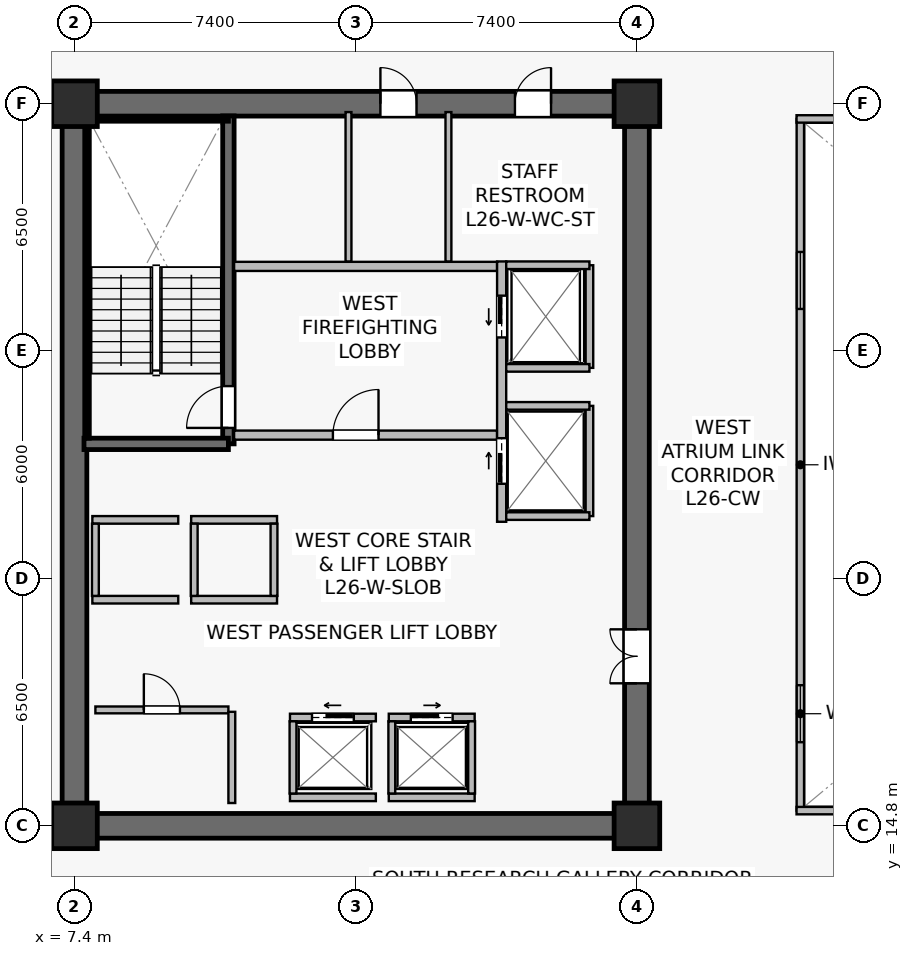
"""IFC4 building model, lengths in metres.
Left out: names, types, materials, properties, quantities, classifications, styles, units other than length and angle.
Written with IfcOpenShell. Run it as: python <this file> out.ifc"""

import sys

from ifc_helpers import new_model, si_unit, direction, frame, frame_2d, origin, origin_2d, place, context, subcontext, project, spatial, rectangle, extrude, source, transform, mapped, element, fill, save


model = new_model("IFC4")
c1 = context("Model", 3, precision=1e-05, world=origin(), true_north=direction((0.0, 1.0)))
c2 = subcontext(c1, "Body", "Model", "MODEL_VIEW")
j1 = project(units=[si_unit("LENGTHUNIT", "METRE"), si_unit("PLANEANGLEUNIT", "RADIAN")], contexts=[c1])
p1 = place(None, origin())
s1 = spatial("IfcSite", under=j1, at=p1, CompositionType="ELEMENT")
p2 = place(p1, origin())
s2 = spatial("IfcBuilding", under=s1, at=p2, CompositionType="ELEMENT")
p3 = place(p2, frame((0.0, 0.0, 109.2)))
s3 = spatial("IfcBuildingStorey", under=s2, at=p3, CompositionType="ELEMENT", Elevation=109.2)
p4 = place(p3, frame((7.075, 14.8, 0.0), z_axis=(0.0, 0.0, 1.0), x_axis=(1.0, 0.0, 0.0)))
e1 = element("IfcWall", 1, at=p4, inside=s3, PredefinedType="SHEAR", context=c2, shape_type="SweptSolid", body=[
    extrude(rectangle(XDim=15.45, YDim=0.65, at=frame_2d((7.725, 0.0))), origin(), (0.0, 0.0, 1.0), 3.79),
])
p5 = place(p3, frame((7.075, 33.8, 0.0), z_axis=(0.0, 0.0, 1.0), x_axis=(1.0, 0.0, 0.0)))
e2 = element("IfcWall", 2, at=p5, inside=s3, PredefinedType="SHEAR", context=c2, shape_type="SweptSolid", body=[
    extrude(rectangle(XDim=15.45, YDim=0.65, at=frame_2d((7.725, 0.0))), origin(), (0.0, 0.0, 1.0), 3.79),
])
p6 = place(p5, frame((8.375, 0.0, 0.0)))
e3 = element("IfcOpeningElement", 3, at=p6, cuts=e2, PredefinedType="OPENING", context=c2, shape_type="SweptSolid", body=[
    extrude(rectangle(XDim=0.95, YDim=2.15, at=frame_2d((0.475, 1.075))), frame((0.0, 0.335, 0.0), z_axis=(0.0, -1.0, 0.0), x_axis=(1.0, 0.0, 0.0)), (0.0, 0.0, 1.0), 0.67),
])
p7 = place(p5, frame((11.915, 0.0, 0.0)))
e4 = element("IfcOpeningElement", 4, at=p7, cuts=e2, PredefinedType="OPENING", context=c2, shape_type="SweptSolid", body=[
    extrude(rectangle(XDim=0.95, YDim=2.15, at=frame_2d((0.475, 1.075))), frame((0.0, 0.335, 0.0), z_axis=(0.0, -1.0, 0.0), x_axis=(1.0, 0.0, 0.0)), (0.0, 0.0, 1.0), 0.67),
])
p8 = place(p3, frame((7.4, 15.125, 0.0), z_axis=(0.0, 0.0, 1.0), x_axis=(0.0, 1.0, 0.0)))
e5 = element("IfcWall", 5, at=p8, inside=s3, PredefinedType="SHEAR", context=c2, shape_type="SweptSolid", body=[
    extrude(rectangle(XDim=18.35, YDim=0.65, at=frame_2d((9.175, 0.0))), origin(), (0.0, 0.0, 1.0), 3.79),
])
p9 = place(p3, frame((22.2, 15.125, 0.0), z_axis=(0.0, 0.0, 1.0), x_axis=(0.0, 1.0, 0.0)))
e6 = element("IfcWall", 6, at=p9, inside=s3, PredefinedType="SHEAR", context=c2, shape_type="SweptSolid", body=[
    extrude(rectangle(XDim=18.35, YDim=0.65, at=frame_2d((9.175, 0.0))), origin(), (0.0, 0.0, 1.0), 3.79),
])
p10 = place(p9, frame((3.425, 0.0, 0.0)))
e7 = element("IfcOpeningElement", 7, at=p10, cuts=e6, PredefinedType="OPENING", context=c2, shape_type="SweptSolid", body=[
    extrude(rectangle(XDim=1.42, YDim=2.2, at=frame_2d((0.71, 1.1))), frame((0.0, 0.335, 0.0), z_axis=(0.0, -1.0, 0.0), x_axis=(1.0, 0.0, 0.0)), (0.0, 0.0, 1.0), 0.67),
])
p11 = place(p3, frame((11.45, 24.85, 0.0), z_axis=(0.0, 0.0, 1.0), x_axis=(0.0, 1.0, 0.0)))
e8 = element("IfcWall", 8, at=p11, inside=s3, PredefinedType="SHEAR", context=c2, shape_type="SweptSolid", body=[
    extrude(rectangle(XDim=8.63, YDim=0.3, at=frame_2d((4.315, 0.0))), origin(), (0.0, 0.0, 1.0), 3.79),
])
p12 = place(p11, frame((0.42, 0.0, 0.0)))
e9 = element("IfcOpeningElement", 9, at=p12, cuts=e8, PredefinedType="OPENING", context=c2, shape_type="SweptSolid", body=[
    extrude(rectangle(XDim=1.1, YDim=2.15, at=frame_2d((0.55, 1.075))), frame((0.0, 0.16, 0.0), z_axis=(0.0, -1.0, 0.0), x_axis=(1.0, 0.0, 0.0)), (0.0, 0.0, 1.0), 0.32),
])
p13 = place(p3, frame((7.65, 24.85, 0.0), z_axis=(0.0, 0.0, 1.0), x_axis=(1.0, 0.0, 0.0)))
e10 = element("IfcWall", 10, at=p13, inside=s3, PredefinedType="SHEAR", context=c2, shape_type="SweptSolid", body=[
    extrude(rectangle(XDim=3.8, YDim=0.3, at=frame_2d((1.9, 0.0))), origin(), (0.0, 0.0, 1.0), 3.79),
])
p14 = place(p3, frame((7.73, 33.4, 0.0), z_axis=(0.0, 0.0, 1.0), x_axis=(1.0, 0.0, 0.0)))
e11 = element("IfcWall", 11, at=p14, inside=s3, PredefinedType="SOLIDWALL", context=c2, shape_type="SweptSolid", body=[
    extrude(rectangle(XDim=3.72, YDim=0.12, at=frame_2d((1.86, 0.0))), origin(), (0.0, 0.0, 1.0), 3.79),
])
p15 = place(p3, frame((7.73, 25.0, 0.0), z_axis=(0.0, 0.0, 1.0), x_axis=(0.0, 1.0, 0.0)))
e12 = element("IfcWall", 12, at=p15, inside=s3, PredefinedType="SOLIDWALL", context=c2, shape_type="SweptSolid", body=[
    extrude(rectangle(XDim=8.32, YDim=0.12, at=frame_2d((4.16, 0.0))), origin(), (0.0, 0.0, 1.0), 3.79),
])
m1 = source(origin(), c2, "Body", "SweptSolid", [
    extrude(rectangle(XDim=1.2, YDim=1.2, at=origin_2d()), origin(), (0.0, 0.0, 1.0), 4.1),
])
for number, where, z_axis, x_axis in (
    (13, (7.4, 14.8, 0.0), (0.0, 0.0, 1.0), (1.0, 0.0, 0.0)),
    (14, (22.2, 14.8, 0.0), (0.0, 0.0, 1.0), (1.0, 0.0, 0.0)),
    (15, (7.4, 33.8, 0.0), (0.0, 0.0, 1.0), (1.0, 0.0, 0.0)),
    (16, (22.2, 33.8, 0.0), (0.0, 0.0, 1.0), (1.0, 0.0, 0.0)),
):
    element("IfcColumn", number, at=place(p3, frame(where, z_axis=z_axis, x_axis=x_axis)), inside=s3, PredefinedType="COLUMN", context=c2, shape_type="MappedRepresentation", body=[
        mapped(m1, transform((0.0, 0.0, 0.0), scale=1.0)),
    ])
p16 = place(p3, frame((11.6, 25.08, 0.0), z_axis=(0.0, 0.0, 1.0), x_axis=(1.0, 0.0, 0.0)))
e17 = element("IfcWall", 17, at=p16, inside=s3, PredefinedType="SOLIDWALL", context=c2, shape_type="SweptSolid", body=[
    extrude(rectangle(XDim=6.92, YDim=0.24, at=frame_2d((3.46, 0.0))), origin(), (0.0, 0.0, 1.0), 3.125),
])
p17 = place(p16, frame((2.6, 0.0, 0.0)))
e18 = element("IfcOpeningElement", 18, at=p17, cuts=e17, PredefinedType="OPENING", context=c2, shape_type="SweptSolid", body=[
    extrude(rectangle(XDim=1.2, YDim=2.16, at=frame_2d((0.6, 1.08))), frame((0.0, 0.13, 0.0), z_axis=(0.0, -1.0, 0.0), x_axis=(1.0, 0.0, 0.0)), (0.0, 0.0, 1.0), 0.26),
])
p18 = place(p3, frame((11.6, 29.52, 0.0), z_axis=(0.0, 0.0, 1.0), x_axis=(1.0, 0.0, 0.0)))
e19 = element("IfcWall", 19, at=p18, inside=s3, PredefinedType="SOLIDWALL", context=c2, shape_type="SweptSolid", body=[
    extrude(rectangle(XDim=6.92, YDim=0.24, at=frame_2d((3.46, 0.0))), origin(), (0.0, 0.0, 1.0), 3.125),
])
p19 = place(p3, frame((18.64, 22.8, 0.0), z_axis=(0.0, 0.0, 1.0), x_axis=(0.0, 1.0, 0.0)))
e20 = element("IfcWall", 20, at=p19, inside=s3, PredefinedType="SOLIDWALL", context=c2, shape_type="SweptSolid", body=[
    extrude(rectangle(XDim=6.85, YDim=0.24, at=frame_2d((3.425, 0.0))), origin(), (0.0, 0.0, 1.0), 2.875),
])
p20 = place(p19, frame((4.85, 0.0, 0.0)))
e21 = element("IfcOpeningElement", 21, at=p20, cuts=e20, PredefinedType="OPENING", context=c2, shape_type="SweptSolid", body=[
    extrude(rectangle(XDim=1.1, YDim=2.22, at=frame_2d((0.55, 1.11))), frame((0.0, 0.13, 0.0), z_axis=(0.0, -1.0, 0.0), x_axis=(1.0, 0.0, 0.0)), (0.0, 0.0, 1.0), 0.26),
])
p21 = place(p19, frame((1.0, 0.0, 0.0)))
e22 = element("IfcOpeningElement", 22, at=p21, cuts=e20, PredefinedType="OPENING", context=c2, shape_type="SweptSolid", body=[
    extrude(rectangle(XDim=1.2, YDim=2.22, at=frame_2d((0.6, 1.11))), frame((0.0, 0.13, 0.0), z_axis=(0.0, -1.0, 0.0), x_axis=(1.0, 0.0, 0.0)), (0.0, 0.0, 1.0), 0.26),
])
p22 = place(p3, frame((13.07, 17.65, 0.0), z_axis=(0.0, 0.0, 1.0), x_axis=(1.0, 0.0, 0.0)))
e23 = element("IfcWall", 23, at=p22, inside=s3, PredefinedType="SOLIDWALL", context=c2, shape_type="SweptSolid", body=[
    extrude(rectangle(XDim=2.26, YDim=0.2, at=frame_2d((1.13, 0.0))), origin(), (0.0, 0.0, 1.0), 3.125),
])
p23 = place(p22, frame((0.58, 0.0, 0.0)))
e24 = element("IfcOpeningElement", 24, at=p23, cuts=e23, PredefinedType="OPENING", context=c2, shape_type="SweptSolid", body=[
    extrude(rectangle(XDim=1.1, YDim=2.22, at=frame_2d((0.55, 1.11))), frame((0.0, 0.11, 0.0), z_axis=(0.0, -1.0, 0.0), x_axis=(1.0, 0.0, 0.0)), (0.0, 0.0, 1.0), 0.22),
])
p24 = place(p3, frame((13.07, 15.55, 0.0), z_axis=(0.0, 0.0, 1.0), x_axis=(1.0, 0.0, 0.0)))
e25 = element("IfcWall", 25, at=p24, inside=s3, PredefinedType="SOLIDWALL", context=c2, shape_type="SweptSolid", body=[
    extrude(rectangle(XDim=2.26, YDim=0.2, at=frame_2d((1.13, 0.0))), origin(), (0.0, 0.0, 1.0), 3.125),
])
p25 = place(p3, frame((13.15, 15.65, 0.0), z_axis=(0.0, 0.0, 1.0), x_axis=(0.0, 1.0, 0.0)))
e26 = element("IfcWall", 26, at=p25, inside=s3, PredefinedType="SOLIDWALL", context=c2, shape_type="SweptSolid", body=[
    extrude(rectangle(XDim=1.9, YDim=0.18, at=frame_2d((0.95, 0.0))), origin(), (0.0, 0.0, 1.0), 3.79),
])
p26 = place(p3, frame((15.67, 17.65, 0.0), z_axis=(0.0, 0.0, 1.0), x_axis=(1.0, 0.0, 0.0)))
e27 = element("IfcWall", 27, at=p26, inside=s3, PredefinedType="SOLIDWALL", context=c2, shape_type="SweptSolid", body=[
    extrude(rectangle(XDim=2.26, YDim=0.2, at=frame_2d((1.13, 0.0))), origin(), (0.0, 0.0, 1.0), 3.79),
])
p27 = place(p26, frame((0.58, 0.0, 0.0)))
e28 = element("IfcOpeningElement", 28, at=p27, cuts=e27, PredefinedType="OPENING", context=c2, shape_type="SweptSolid", body=[
    extrude(rectangle(XDim=1.1, YDim=2.22, at=frame_2d((0.55, 1.11))), frame((0.0, 0.11, 0.0), z_axis=(0.0, -1.0, 0.0), x_axis=(1.0, 0.0, 0.0)), (0.0, 0.0, 1.0), 0.22),
])
p28 = place(p3, frame((15.67, 15.55, 0.0), z_axis=(0.0, 0.0, 1.0), x_axis=(1.0, 0.0, 0.0)))
e29 = element("IfcWall", 29, at=p28, inside=s3, PredefinedType="SOLIDWALL", context=c2, shape_type="SweptSolid", body=[
    extrude(rectangle(XDim=2.26, YDim=0.2, at=frame_2d((1.13, 0.0))), origin(), (0.0, 0.0, 1.0), 3.79),
])
for number, where, z_axis, x_axis in (
    (30, (15.75, 15.65, 0.0), (0.0, 0.0, 1.0), (0.0, 1.0, 0.0)),
    (31, (17.85, 15.65, 0.0), (0.0, 0.0, 1.0), (0.0, 1.0, 0.0)),
):
    element("IfcWall", number, at=place(p3, frame(where, z_axis=z_axis, x_axis=x_axis)), inside=s3, PredefinedType="SOLIDWALL", context=c2, shape_type="SweptSolid", body=[
        extrude(rectangle(XDim=1.9, YDim=0.18, at=frame_2d((0.95, 0.0))), origin(), (0.0, 0.0, 1.0), 3.79),
    ])
for number, where, z_axis, x_axis in (
    (32, (7.87, 20.75, 0.0), (0.0, 0.0, 1.0), (1.0, 0.0, 0.0)),
    (33, (7.87, 22.85, 0.0), (0.0, 0.0, 1.0), (1.0, 0.0, 0.0)),
):
    element("IfcWall", number, at=place(p3, frame(where, z_axis=z_axis, x_axis=x_axis)), inside=s3, PredefinedType="SOLIDWALL", context=c2, shape_type="SweptSolid", body=[
        extrude(rectangle(XDim=2.26, YDim=0.2, at=frame_2d((1.13, 0.0))), origin(), (0.0, 0.0, 1.0), 3.79),
    ])
p29 = place(p3, frame((7.95, 20.85, 0.0), z_axis=(0.0, 0.0, 1.0), x_axis=(0.0, 1.0, 0.0)))
e34 = element("IfcWall", 34, at=p29, inside=s3, PredefinedType="SOLIDWALL", context=c2, shape_type="SweptSolid", body=[
    extrude(rectangle(XDim=1.9, YDim=0.18, at=frame_2d((0.95, 0.0))), origin(), (0.0, 0.0, 1.0), 3.79),
])
for number, where, z_axis, x_axis in (
    (35, (10.47, 20.75, 0.0), (0.0, 0.0, 1.0), (1.0, 0.0, 0.0)),
    (36, (10.47, 22.85, 0.0), (0.0, 0.0, 1.0), (1.0, 0.0, 0.0)),
):
    element("IfcWall", number, at=place(p3, frame(where, z_axis=z_axis, x_axis=x_axis)), inside=s3, PredefinedType="SOLIDWALL", context=c2, shape_type="SweptSolid", body=[
        extrude(rectangle(XDim=2.26, YDim=0.2, at=frame_2d((1.13, 0.0))), origin(), (0.0, 0.0, 1.0), 3.79),
    ])
for number, where, z_axis, x_axis in (
    (37, (10.55, 20.85, 0.0), (0.0, 0.0, 1.0), (0.0, 1.0, 0.0)),
    (38, (12.65, 20.85, 0.0), (0.0, 0.0, 1.0), (0.0, 1.0, 0.0)),
):
    element("IfcWall", number, at=place(p3, frame(where, z_axis=z_axis, x_axis=x_axis)), inside=s3, PredefinedType="SOLIDWALL", context=c2, shape_type="SweptSolid", body=[
        extrude(rectangle(XDim=1.9, YDim=0.18, at=frame_2d((0.95, 0.0))), origin(), (0.0, 0.0, 1.0), 3.79),
    ])
p30 = place(p3, frame((20.95, 26.85, 0.0), z_axis=(0.0, 0.0, 1.0), x_axis=(0.0, 1.0, 0.0)))
e39 = element("IfcWall", 39, at=p30, inside=s3, PredefinedType="SOLIDWALL", context=c2, shape_type="SweptSolid", body=[
    extrude(rectangle(XDim=2.7, YDim=0.2, at=frame_2d((1.35, 0.0))), origin(), (0.0, 0.0, 1.0), 3.79),
])
p31 = place(p3, frame((18.76, 29.55, 0.0), z_axis=(0.0, 0.0, 1.0), x_axis=(1.0, 0.0, 0.0)))
e40 = element("IfcWall", 40, at=p31, inside=s3, PredefinedType="SOLIDWALL", context=c2, shape_type="SweptSolid", body=[
    extrude(rectangle(XDim=2.19, YDim=0.2, at=frame_2d((1.095, 0.0))), origin(), (0.0, 0.0, 1.0), 3.79),
])
p32 = place(p3, frame((18.76, 26.85, 0.0), z_axis=(0.0, 0.0, 1.0), x_axis=(1.0, 0.0, 0.0)))
e41 = element("IfcWall", 41, at=p32, inside=s3, PredefinedType="SOLIDWALL", context=c2, shape_type="SweptSolid", body=[
    extrude(rectangle(XDim=2.19, YDim=0.2, at=frame_2d((1.095, 0.0))), origin(), (0.0, 0.0, 1.0), 3.187),
])
p33 = place(p3, frame((20.95, 22.95, 0.0), z_axis=(0.0, 0.0, 1.0), x_axis=(0.0, 1.0, 0.0)))
e42 = element("IfcWall", 42, at=p33, inside=s3, PredefinedType="SOLIDWALL", context=c2, shape_type="SweptSolid", body=[
    extrude(rectangle(XDim=2.9, YDim=0.2, at=frame_2d((1.45, 0.0))), origin(), (0.0, 0.0, 1.0), 2.875),
])
for number, where, z_axis, x_axis in (
    (43, (18.76, 25.85, 0.0), (0.0, 0.0, 1.0), (1.0, 0.0, 0.0)),
    (44, (18.76, 22.95, 0.0), (0.0, 0.0, 1.0), (1.0, 0.0, 0.0)),
):
    element("IfcWall", number, at=place(p3, frame(where, z_axis=z_axis, x_axis=x_axis)), inside=s3, PredefinedType="SOLIDWALL", context=c2, shape_type="SweptSolid", body=[
        extrude(rectangle(XDim=2.19, YDim=0.2, at=frame_2d((1.095, 0.0))), origin(), (0.0, 0.0, 1.0), 3.79),
    ])
p34 = place(p3, frame((7.95, 17.85, 0.0), z_axis=(0.0, 0.0, 1.0), x_axis=(1.0, 0.0, 0.0)))
e45 = element("IfcWall", 45, at=p34, inside=s3, PredefinedType="SOLIDWALL", context=c2, shape_type="SweptSolid", body=[
    extrude(rectangle(XDim=3.5, YDim=0.18, at=frame_2d((1.75, 0.0))), origin(), (0.0, 0.0, 1.0), 3.79),
])
p35 = place(p34, frame((1.275, 0.0, 0.0)))
e46 = element("IfcOpeningElement", 46, at=p35, cuts=e45, PredefinedType="OPENING", context=c2, shape_type="SweptSolid", body=[
    extrude(rectangle(XDim=0.95, YDim=2.15, at=frame_2d((0.475, 1.075))), frame((0.0, 0.1, 0.0), z_axis=(0.0, -1.0, 0.0), x_axis=(1.0, 0.0, 0.0)), (0.0, 0.0, 1.0), 0.2),
])
p36 = place(p3, frame((11.54, 15.4, 0.0), z_axis=(0.0, 0.0, 1.0), x_axis=(0.0, 1.0, 0.0)))
e47 = element("IfcWall", 47, at=p36, inside=s3, PredefinedType="SOLIDWALL", context=c2, shape_type="SweptSolid", body=[
    extrude(rectangle(XDim=2.4, YDim=0.18, at=frame_2d((1.2, 0.0))), origin(), (0.0, 0.0, 1.0), 3.79),
])
p37 = place(p3, frame((14.61, 29.65, 0.0), z_axis=(0.0, 0.0, 1.0), x_axis=(0.0, 1.0, 0.0)))
e48 = element("IfcWall", 48, at=p37, inside=s3, PredefinedType="PLUMBINGWALL", context=c2, shape_type="SweptSolid", body=[
    extrude(rectangle(XDim=3.93, YDim=0.155, at=frame_2d((1.965, 0.0))), origin(), (0.0, 0.0, 1.0), 3.125),
])
p38 = place(p3, frame((17.24, 29.65, 0.0), z_axis=(0.0, 0.0, 1.0), x_axis=(0.0, 1.0, 0.0)))
e49 = element("IfcWall", 49, at=p38, inside=s3, PredefinedType="PLUMBINGWALL", context=c2, shape_type="SweptSolid", body=[
    extrude(rectangle(XDim=3.93, YDim=0.155, at=frame_2d((1.965, 0.0))), origin(), (0.0, 0.0, 1.0), 3.79),
])
p39 = place(p3, frame((26.5, 15.2, 0.0), z_axis=(0.0, 0.0, 1.0), x_axis=(0.0, 1.0, 0.0)))
e50 = element("IfcWall", 50, at=p39, inside=s3, PredefinedType="SOLIDWALL", context=c2, shape_type="SweptSolid", body=[
    extrude(rectangle(XDim=18.2, YDim=0.195, at=frame_2d((9.1, 0.0))), origin(), (0.0, 0.0, 1.0), 3.79),
])
p40 = place(p39, frame((1.8, 0.0, 0.9)))
e51 = element("IfcOpeningElement", 51, at=p40, cuts=e50, PredefinedType="OPENING", context=c2, shape_type="SweptSolid", body=[
    extrude(rectangle(XDim=1.5, YDim=1.4, at=frame_2d((0.75, 0.7))), frame((0.0, 0.107, 0.0), z_axis=(0.0, -1.0, 0.0), x_axis=(1.0, 0.0, 0.0)), (0.0, 0.0, 1.0), 0.215),
])
p41 = place(p39, frame((13.2, 0.0, 0.9)))
e52 = element("IfcOpeningElement", 52, at=p41, cuts=e50, PredefinedType="OPENING", context=c2, shape_type="SweptSolid", body=[
    extrude(rectangle(XDim=1.5, YDim=1.4, at=frame_2d((0.75, 0.7))), frame((0.0, 0.107, 0.0), z_axis=(0.0, -1.0, 0.0), x_axis=(1.0, 0.0, 0.0)), (0.0, 0.0, 1.0), 0.215),
])
for number, where, z_axis, x_axis in (
    (53, (26.4, 15.2, 0.0), (0.0, 0.0, 1.0), (1.0, 0.0, 0.0)),
    (54, (26.4, 33.4, 0.0), (0.0, 0.0, 1.0), (1.0, 0.0, 0.0)),
):
    element("IfcWall", number, at=place(p3, frame(where, z_axis=z_axis, x_axis=x_axis)), inside=s3, PredefinedType="SOLIDWALL", context=c2, shape_type="SweptSolid", body=[
        extrude(rectangle(XDim=22.0, YDim=0.195, at=frame_2d((11.0, 0.0))), origin(), (0.0, 0.0, 1.0), 3.79),
    ])
m2 = source(origin(), c2, "Body", "SweptSolid", [
    extrude(rectangle(XDim=1.5, YDim=1.4, at=frame_2d((0.75, 0.7))), frame((0.0, 0.03, 0.0), z_axis=(0.0, -1.0, 0.0), x_axis=(1.0, 0.0, 0.0)), (0.0, 0.0, 1.0), 0.06),
])
p42 = place(p40, origin())
e55 = element("IfcWindow", 55, at=p42, inside=s3, PartitioningType="SINGLE_PANEL", PredefinedType="WINDOW", context=c2, shape_type="MappedRepresentation", body=[
    mapped(m2, transform((0.0, 0.0, 0.0), scale=1.0)),
])
fill(e51, e55)
p43 = place(p41, origin())
e56 = element("IfcWindow", 56, at=p43, inside=s3, PartitioningType="SINGLE_PANEL", PredefinedType="WINDOW", context=c2, shape_type="MappedRepresentation", body=[
    mapped(m2, transform((0.0, 0.0, 0.0), scale=1.0)),
])
fill(e52, e56)
m3 = source(origin(), c2, "Body", "SweptSolid", [
    extrude(rectangle(XDim=1.1, YDim=2.15, at=frame_2d((0.55, 1.075))), frame((0.0, 0.025, 0.0), z_axis=(0.0, -1.0, 0.0), x_axis=(1.0, 0.0, 0.0)), (0.0, 0.0, 1.0), 0.05),
])
p44 = place(p12, origin())
e57 = element("IfcDoor", 57, at=p44, inside=s3, OperationType="SINGLE_SWING_LEFT", PredefinedType="DOOR", context=c2, shape_type="MappedRepresentation", body=[
    mapped(m3, transform((0.0, 0.0, 0.0), scale=1.0)),
])
fill(e9, e57)
m4 = source(origin(), c2, "Body", "SweptSolid", [
    extrude(rectangle(XDim=1.2, YDim=2.16, at=frame_2d((0.6, 1.08))), frame((0.0, 0.025, 0.0), z_axis=(0.0, -1.0, 0.0), x_axis=(1.0, 0.0, 0.0)), (0.0, 0.0, 1.0), 0.05),
])
p45 = place(p17, origin())
e58 = element("IfcDoor", 58, at=p45, inside=s3, OperationType="SINGLE_SWING_RIGHT", PredefinedType="DOOR", context=c2, shape_type="MappedRepresentation", body=[
    mapped(m4, transform((0.0, 0.0, 0.0), scale=1.0)),
])
fill(e18, e58)
m5 = source(origin(), c2, "Body", "SweptSolid", [
    extrude(rectangle(XDim=1.1, YDim=2.22, at=frame_2d((0.55, 1.11))), frame((0.0, 0.025, 0.0), z_axis=(0.0, -1.0, 0.0), x_axis=(1.0, 0.0, 0.0)), (0.0, 0.0, 1.0), 0.05),
])
p46 = place(p23, origin())
e59 = element("IfcDoor", 59, at=p46, inside=s3, OperationType="SLIDING_TO_LEFT", PredefinedType="USERDEFINED", context=c2, shape_type="MappedRepresentation", body=[
    mapped(m5, transform((0.0, 0.0, 0.0), scale=1.0)),
])
fill(e24, e59)
p47 = place(p27, origin())
e60 = element("IfcDoor", 60, at=p47, inside=s3, OperationType="SLIDING_TO_RIGHT", PredefinedType="USERDEFINED", context=c2, shape_type="MappedRepresentation", body=[
    mapped(m5, transform((0.0, 0.0, 0.0), scale=1.0)),
])
fill(e28, e60)
p48 = place(p20, origin())
e61 = element("IfcDoor", 61, at=p48, inside=s3, OperationType="SLIDING_TO_LEFT", PredefinedType="USERDEFINED", context=c2, shape_type="MappedRepresentation", body=[
    mapped(m5, transform((0.0, 0.0, 0.0), scale=1.0)),
])
fill(e21, e61)
m6 = source(origin(), c2, "Body", "SweptSolid", [
    extrude(rectangle(XDim=1.2, YDim=2.22, at=frame_2d((0.6, 1.11))), frame((0.0, 0.025, 0.0), z_axis=(0.0, -1.0, 0.0), x_axis=(1.0, 0.0, 0.0)), (0.0, 0.0, 1.0), 0.05),
])
p49 = place(p21, origin())
e62 = element("IfcDoor", 62, at=p49, inside=s3, OperationType="SLIDING_TO_RIGHT", PredefinedType="USERDEFINED", context=c2, shape_type="MappedRepresentation", body=[
    mapped(m6, transform((0.0, 0.0, 0.0), scale=1.0)),
])
fill(e22, e62)
m7 = source(origin(), c2, "Body", "SweptSolid", [
    extrude(rectangle(XDim=0.95, YDim=2.15, at=frame_2d((0.475, 1.075))), frame((0.0, 0.025, 0.0), z_axis=(0.0, -1.0, 0.0), x_axis=(1.0, 0.0, 0.0)), (0.0, 0.0, 1.0), 0.05),
])
p50 = place(p35, origin())
e63 = element("IfcDoor", 63, at=p50, inside=s3, OperationType="SINGLE_SWING_LEFT", PredefinedType="DOOR", context=c2, shape_type="MappedRepresentation", body=[
    mapped(m7, transform((0.0, 0.0, 0.0), scale=1.0)),
])
fill(e46, e63)
m8 = source(origin(), c2, "Body", "SweptSolid", [
    extrude(rectangle(XDim=1.42, YDim=2.2, at=frame_2d((0.71, 1.1))), frame((0.0, 0.025, 0.0), z_axis=(0.0, -1.0, 0.0), x_axis=(1.0, 0.0, 0.0)), (0.0, 0.0, 1.0), 0.05),
])
p51 = place(p10, origin())
e64 = element("IfcDoor", 64, at=p51, inside=s3, OperationType="DOUBLE_DOOR_SINGLE_SWING", PredefinedType="DOOR", context=c2, shape_type="MappedRepresentation", body=[
    mapped(m8, transform((0.0, 0.0, 0.0), scale=1.0)),
])
fill(e7, e64)
p52 = place(p6, origin())
e65 = element("IfcDoor", 65, at=p52, inside=s3, OperationType="SINGLE_SWING_LEFT", PredefinedType="DOOR", context=c2, shape_type="MappedRepresentation", body=[
    mapped(m7, transform((0.0, 0.0, 0.0), scale=1.0)),
])
fill(e3, e65)
p53 = place(p7, origin())
e66 = element("IfcDoor", 66, at=p53, inside=s3, OperationType="SINGLE_SWING_RIGHT", PredefinedType="DOOR", context=c2, shape_type="MappedRepresentation", body=[
    mapped(m7, transform((0.0, 0.0, 0.0), scale=1.0)),
])
fill(e4, e66)
save(model, sys.argv[1])
